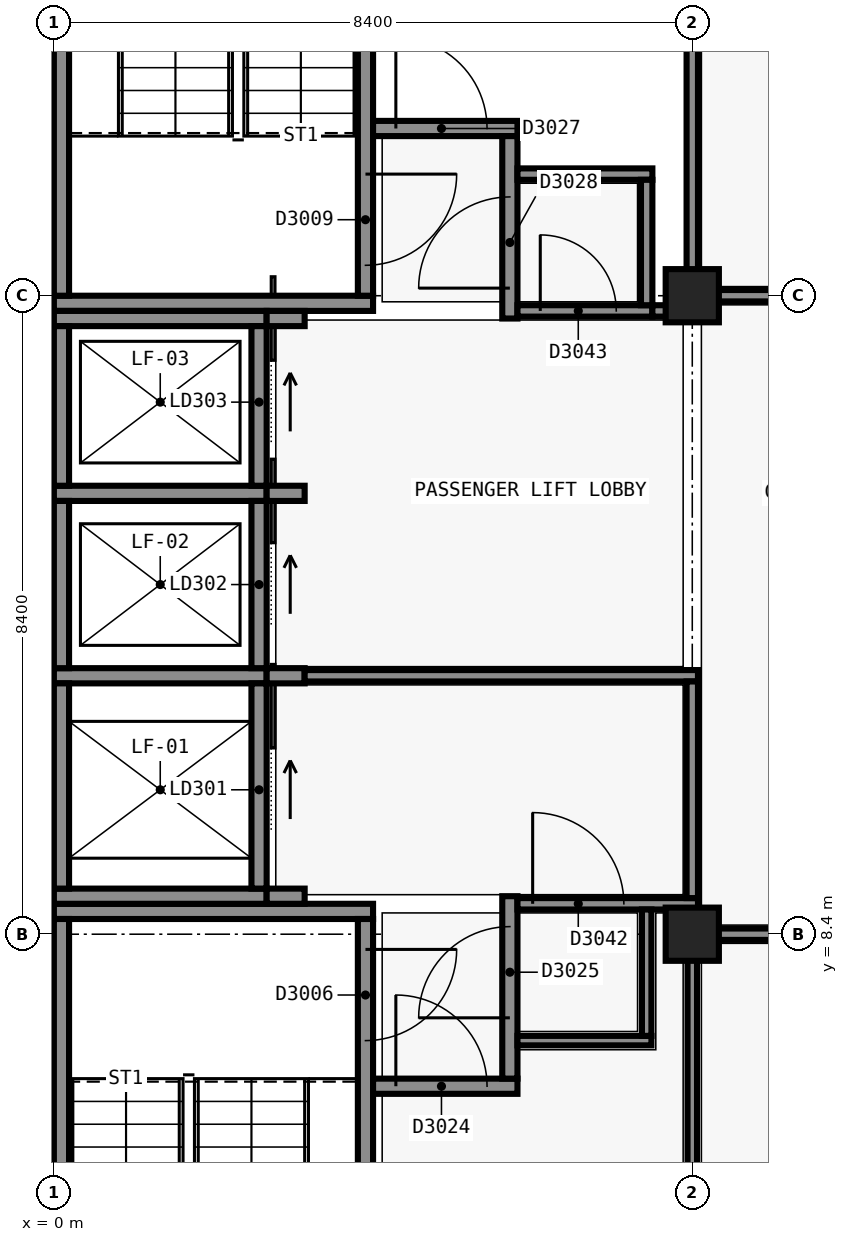
"""IFC4 building model, lengths in metres.
Left out: names, types, materials, properties, quantities, classifications, styles, units other than length and angle.
Written with IfcOpenShell. Run it as: python <this file> out.ifc"""

import sys

from ifc_helpers import new_model, si_unit, direction, frame, frame_2d, origin, origin_2d, place, context, subcontext, project, spatial, rectangle, extrude, element, fill, save


model = new_model("IFC4")
c1 = context("Model", 3, precision=1e-05, world=origin(), true_north=direction((0.0, 1.0)))
c2 = subcontext(c1, "Body", "Model", "MODEL_VIEW")
j1 = project(units=[si_unit("LENGTHUNIT", "METRE"), si_unit("PLANEANGLEUNIT", "RADIAN")], contexts=[c1])
p1 = place(None, origin())
s1 = spatial("IfcSite", under=j1, at=p1, CompositionType="ELEMENT")
p2 = place(p1, origin())
s2 = spatial("IfcBuilding", under=s1, at=p2, CompositionType="ELEMENT")
p3 = place(p2, frame((0.0, 0.0, 15.0)))
s3 = spatial("IfcBuildingStorey", under=s2, at=p3, CompositionType="ELEMENT", Elevation=15.0)
p4 = place(p3, frame((0.0, 8.7, 0.0), z_axis=(0.0, 0.0, 1.0), x_axis=(1.0, 0.0, 0.0)))
e1 = element("IfcWall", 1, at=p4, inside=s3, PredefinedType="SHEAR", context=c2, shape_type="SweptSolid", body=[
    extrude(rectangle(XDim=4.199, YDim=0.2, at=frame_2d((2.1, 0.0))), origin(), (0.0, 0.0, 1.0), 4.8),
])
p5 = place(p3, frame((0.1, 0.2, 0.0), z_axis=(0.0, 0.0, 1.0), x_axis=(0.0, 1.0, 0.0)))
e2 = element("IfcWall", 2, at=p5, inside=s3, PredefinedType="SHEAR", context=c2, shape_type="SweptSolid", body=[
    extrude(rectangle(XDim=8.4, YDim=0.2, at=frame_2d((4.2, 0.0))), origin(), (0.0, 0.0, 1.0), 4.8),
])
p6 = place(p3, frame((4.1, 8.6, 0.0), z_axis=(0.0, 0.0, 1.0), x_axis=(0.0, -1.0, 0.0)))
e3 = element("IfcWall", 3, at=p6, inside=s3, PredefinedType="SHEAR", context=c2, shape_type="SweptSolid", body=[
    extrude(rectangle(XDim=8.4, YDim=0.2, at=frame_2d((4.2, 0.0))), origin(), (0.0, 0.0, 1.0), 4.8),
])
p7 = place(p6, frame((0.4, 0.0, 0.0)))
e4 = element("IfcOpeningElement", 4, at=p7, cuts=e3, PredefinedType="OPENING", context=c2, shape_type="SweptSolid", body=[
    extrude(rectangle(XDim=1.2, YDim=2.1, at=frame_2d((0.6, 1.05))), frame((0.0, 0.11, 0.0), z_axis=(0.0, -1.0, 0.0), x_axis=(1.0, 0.0, 0.0)), (0.0, 0.0, 1.0), 0.22),
])
p8 = place(p3, frame((4.2, 16.7, 0.0), z_axis=(0.0, 0.0, 1.0), x_axis=(-1.0, 0.0, 0.0)))
e5 = element("IfcWall", 5, at=p8, inside=s3, PredefinedType="SHEAR", context=c2, shape_type="SweptSolid", body=[
    extrude(rectangle(XDim=4.199, YDim=0.2, at=frame_2d((2.1, 0.0))), origin(), (0.0, 0.0, 1.0), 4.8),
])
p9 = place(p3, frame((0.1, 16.8, 0.0), z_axis=(0.0, 0.0, 1.0), x_axis=(0.0, 1.0, 0.0)))
e6 = element("IfcWall", 6, at=p9, inside=s3, PredefinedType="SHEAR", context=c2, shape_type="SweptSolid", body=[
    extrude(rectangle(XDim=8.2, YDim=0.2, at=frame_2d((4.1, 0.0))), origin(), (0.0, 0.0, 1.0), 4.8),
])
p10 = place(p3, frame((4.1, 25.0, 0.0), z_axis=(0.0, 0.0, 1.0), x_axis=(0.0, -1.0, 0.0)))
e7 = element("IfcWall", 7, at=p10, inside=s3, PredefinedType="SHEAR", context=c2, shape_type="SweptSolid", body=[
    extrude(rectangle(XDim=8.2, YDim=0.2, at=frame_2d((4.1, 0.0))), origin(), (0.0, 0.0, 1.0), 4.8),
])
p11 = place(p10, frame((6.6, 0.0, 0.0)))
e8 = element("IfcOpeningElement", 8, at=p11, cuts=e7, PredefinedType="OPENING", context=c2, shape_type="SweptSolid", body=[
    extrude(rectangle(XDim=1.2, YDim=2.1, at=frame_2d((0.6, 1.05))), frame((0.0, 0.11, 0.0), z_axis=(0.0, -1.0, 0.0), x_axis=(1.0, 0.0, 0.0)), (0.0, 0.0, 1.0), 0.22),
])
for number, where, z_axis, x_axis in (
    (9, (2.8, 8.9, 0.0), (0.0, 0.0, 1.0), (-1.0, 0.0, 0.0)),
    (10, (0.0, 11.8, 0.0), (0.0, 0.0, 1.0), (1.0, 0.0, 0.0)),
):
    element("IfcWall", number, at=place(p3, frame(where, z_axis=z_axis, x_axis=x_axis)), inside=s3, PredefinedType="SHEAR", context=c2, shape_type="SweptSolid", body=[
        extrude(rectangle(XDim=2.8, YDim=0.2, at=frame_2d((1.4, 0.0))), origin(), (0.0, 0.0, 1.0), 4.8),
    ])
p12 = place(p3, frame((0.1, 9.0, 0.0), z_axis=(0.0, 0.0, 1.0), x_axis=(0.0, 1.0, 0.0)))
e11 = element("IfcWall", 11, at=p12, inside=s3, PredefinedType="SHEAR", context=c2, shape_type="SweptSolid", body=[
    extrude(rectangle(XDim=2.7, YDim=0.2, at=frame_2d((1.35, 0.0))), origin(), (0.0, 0.0, 1.0), 4.8),
])
p13 = place(p3, frame((2.7, 11.7, 0.0), z_axis=(0.0, 0.0, 1.0), x_axis=(0.0, -1.0, 0.0)))
e12 = element("IfcWall", 12, at=p13, inside=s3, PredefinedType="SHEAR", context=c2, shape_type="SweptSolid", body=[
    extrude(rectangle(XDim=2.7, YDim=0.2, at=frame_2d((1.35, 0.0))), origin(), (0.0, 0.0, 1.0), 4.8),
])
p14 = place(p13, frame((0.85, 0.0, 0.0)))
e13 = element("IfcOpeningElement", 13, at=p14, cuts=e12, PredefinedType="OPENING", context=c2, shape_type="SweptSolid", body=[
    extrude(rectangle(XDim=1.1, YDim=2.1, at=frame_2d((0.55, 1.05))), frame((0.0, 0.11, 0.0), z_axis=(0.0, -1.0, 0.0), x_axis=(1.0, 0.0, 0.0)), (0.0, 0.0, 1.0), 0.22),
])
p15 = place(p3, frame((0.0, 14.2, 0.0), z_axis=(0.0, 0.0, 1.0), x_axis=(1.0, 0.0, 0.0)))
e14 = element("IfcWall", 14, at=p15, inside=s3, PredefinedType="SHEAR", context=c2, shape_type="SweptSolid", body=[
    extrude(rectangle(XDim=2.8, YDim=0.2, at=frame_2d((1.4, 0.0))), origin(), (0.0, 0.0, 1.0), 4.8),
])
p16 = place(p3, frame((0.1, 11.9, 0.0), z_axis=(0.0, 0.0, 1.0), x_axis=(0.0, 1.0, 0.0)))
e15 = element("IfcWall", 15, at=p16, inside=s3, PredefinedType="SHEAR", context=c2, shape_type="SweptSolid", body=[
    extrude(rectangle(XDim=2.2, YDim=0.2, at=frame_2d((1.1, 0.0))), origin(), (0.0, 0.0, 1.0), 4.8),
])
p17 = place(p3, frame((2.7, 14.1, 0.0), z_axis=(0.0, 0.0, 1.0), x_axis=(0.0, -1.0, 0.0)))
e16 = element("IfcWall", 16, at=p17, inside=s3, PredefinedType="SHEAR", context=c2, shape_type="SweptSolid", body=[
    extrude(rectangle(XDim=2.2, YDim=0.2, at=frame_2d((1.1, 0.0))), origin(), (0.0, 0.0, 1.0), 4.8),
])
p18 = place(p17, frame((0.55, 0.0, 0.0)))
e17 = element("IfcOpeningElement", 17, at=p18, cuts=e16, PredefinedType="OPENING", context=c2, shape_type="SweptSolid", body=[
    extrude(rectangle(XDim=1.1, YDim=2.1, at=frame_2d((0.55, 1.05))), frame((0.0, 0.11, 0.0), z_axis=(0.0, -1.0, 0.0), x_axis=(1.0, 0.0, 0.0)), (0.0, 0.0, 1.0), 0.22),
])
p19 = place(p3, frame((0.0, 16.5, 0.0), z_axis=(0.0, 0.0, 1.0), x_axis=(1.0, 0.0, 0.0)))
e18 = element("IfcWall", 18, at=p19, inside=s3, PredefinedType="SHEAR", context=c2, shape_type="SweptSolid", body=[
    extrude(rectangle(XDim=2.8, YDim=0.2, at=frame_2d((1.4, 0.0))), origin(), (0.0, 0.0, 1.0), 4.8),
])
p20 = place(p3, frame((0.1, 14.3, 0.0), z_axis=(0.0, 0.0, 1.0), x_axis=(0.0, 1.0, 0.0)))
e19 = element("IfcWall", 19, at=p20, inside=s3, PredefinedType="SHEAR", context=c2, shape_type="SweptSolid", body=[
    extrude(rectangle(XDim=2.1, YDim=0.2, at=frame_2d((1.05, 0.0))), origin(), (0.0, 0.0, 1.0), 4.8),
])
p21 = place(p3, frame((2.7, 16.4, 0.0), z_axis=(0.0, 0.0, 1.0), x_axis=(0.0, -1.0, 0.0)))
e20 = element("IfcWall", 20, at=p21, inside=s3, PredefinedType="SHEAR", context=c2, shape_type="SweptSolid", body=[
    extrude(rectangle(XDim=2.1, YDim=0.2, at=frame_2d((1.05, 0.0))), origin(), (0.0, 0.0, 1.0), 4.8),
])
p22 = place(p21, frame((0.45, 0.0, 0.0)))
e21 = element("IfcOpeningElement", 21, at=p22, cuts=e20, PredefinedType="OPENING", context=c2, shape_type="SweptSolid", body=[
    extrude(rectangle(XDim=1.1, YDim=2.1, at=frame_2d((0.55, 1.05))), frame((0.0, 0.11, 0.0), z_axis=(0.0, -1.0, 0.0), x_axis=(1.0, 0.0, 0.0)), (0.0, 0.0, 1.0), 0.22),
])
for number, where, z_axis, x_axis in (
    (22, (8.4, 8.4, 0.0), (0.0, 0.0, 1.0), (1.0, 0.0, 0.0)),
    (23, (8.4, 16.8, 0.0), (0.0, 0.0, 1.0), (1.0, 0.0, 0.0)),
):
    element("IfcColumn", number, at=place(p3, frame(where, z_axis=z_axis, x_axis=x_axis)), inside=s3, PredefinedType="COLUMN", context=c2, shape_type="SweptSolid", body=[
        extrude(rectangle(XDim=0.7, YDim=0.7, at=origin_2d()), origin(), (0.0, 0.0, 1.0), 4.8),
    ])
for number, where, z_axis, x_axis in (
    (24, (3.3, 8.9, 0.0), (0.0, 0.0, 1.0), (-1.0, 0.0, 0.0)),
    (25, (2.8, 11.8, 0.0), (0.0, 0.0, 1.0), (1.0, 0.0, 0.0)),
    (26, (2.8, 14.2, 0.0), (0.0, 0.0, 1.0), (1.0, 0.0, 0.0)),
    (27, (2.8, 16.5, 0.0), (0.0, 0.0, 1.0), (1.0, 0.0, 0.0)),
):
    element("IfcWall", number, at=place(p3, frame(where, z_axis=z_axis, x_axis=x_axis)), inside=s3, PredefinedType="SHEAR", context=c2, shape_type="SweptSolid", body=[
        extrude(rectangle(XDim=0.5, YDim=0.2, at=frame_2d((0.25, 0.0))), origin(), (0.0, 0.0, 1.0), 4.8),
    ])
p23 = place(p3, frame((4.2, 6.4, 0.0), z_axis=(0.0, 0.0, 1.0), x_axis=(1.0, 0.0, 0.0)))
e28 = element("IfcWall", 28, at=p23, inside=s3, PredefinedType="SOLIDWALL", context=c2, shape_type="SweptSolid", body=[
    extrude(rectangle(XDim=1.9, YDim=0.2, at=frame_2d((0.95, 0.0))), origin(), (0.0, 0.0, 1.0), 4.5),
])
p24 = place(p23, frame((0.3, 0.0, 0.0)))
e29 = element("IfcOpeningElement", 29, at=p24, cuts=e28, PredefinedType="OPENING", context=c2, shape_type="SweptSolid", body=[
    extrude(rectangle(XDim=1.2, YDim=2.1, at=frame_2d((0.6, 1.05))), frame((0.0, 0.11, 0.0), z_axis=(0.0, -1.0, 0.0), x_axis=(1.0, 0.0, 0.0)), (0.0, 0.0, 1.0), 0.22),
])
p25 = place(p3, frame((4.2, 19.0, 0.0), z_axis=(0.0, 0.0, 1.0), x_axis=(1.0, 0.0, 0.0)))
e30 = element("IfcWall", 30, at=p25, inside=s3, PredefinedType="SOLIDWALL", context=c2, shape_type="SweptSolid", body=[
    extrude(rectangle(XDim=1.9, YDim=0.2, at=frame_2d((0.95, 0.0))), origin(), (0.0, 0.0, 1.0), 4.5),
])
p26 = place(p25, frame((0.3, 0.0, 0.0)))
e31 = element("IfcOpeningElement", 31, at=p26, cuts=e30, PredefinedType="OPENING", context=c2, shape_type="SweptSolid", body=[
    extrude(rectangle(XDim=1.2, YDim=2.1, at=frame_2d((0.6, 1.05))), frame((0.0, 0.11, 0.0), z_axis=(0.0, -1.0, 0.0), x_axis=(1.0, 0.0, 0.0)), (0.0, 0.0, 1.0), 0.22),
])
p27 = place(p3, frame((6.0, 6.5, 0.0), z_axis=(0.0, 0.0, 1.0), x_axis=(0.0, 1.0, 0.0)))
e32 = element("IfcWall", 32, at=p27, inside=s3, PredefinedType="SOLIDWALL", context=c2, shape_type="SweptSolid", body=[
    extrude(rectangle(XDim=2.4, YDim=0.2, at=frame_2d((1.2, 0.0))), origin(), (0.0, 0.0, 1.0), 4.0),
])
p28 = place(p27, frame((0.8, 0.0, 0.0)))
e33 = element("IfcOpeningElement", 33, at=p28, cuts=e32, PredefinedType="OPENING", context=c2, shape_type="SweptSolid", body=[
    extrude(rectangle(XDim=1.2, YDim=2.1, at=frame_2d((0.6, 1.05))), frame((0.0, 0.11, 0.0), z_axis=(0.0, -1.0, 0.0), x_axis=(1.0, 0.0, 0.0)), (0.0, 0.0, 1.0), 0.22),
])
p29 = place(p3, frame((6.0, 16.5, 0.0), z_axis=(0.0, 0.0, 1.0), x_axis=(0.0, 1.0, 0.0)))
e34 = element("IfcWall", 34, at=p29, inside=s3, PredefinedType="SOLIDWALL", context=c2, shape_type="SweptSolid", body=[
    extrude(rectangle(XDim=2.4, YDim=0.2, at=frame_2d((1.2, 0.0))), origin(), (0.0, 0.0, 1.0), 4.0),
])
p30 = place(p29, frame((0.4, 0.0, 0.0)))
e35 = element("IfcOpeningElement", 35, at=p30, cuts=e34, PredefinedType="OPENING", context=c2, shape_type="SweptSolid", body=[
    extrude(rectangle(XDim=1.2, YDim=2.1, at=frame_2d((0.6, 1.05))), frame((0.0, 0.11, 0.0), z_axis=(0.0, -1.0, 0.0), x_axis=(1.0, 0.0, 0.0)), (0.0, 0.0, 1.0), 0.22),
])
p31 = place(p3, frame((8.325, 8.4, 0.0), z_axis=(0.0, 0.0, 1.0), x_axis=(1.0, 0.0, 0.0)))
e36 = element("IfcWall", 36, at=p31, inside=s3, PredefinedType="PARTITIONING", context=c2, shape_type="SweptSolid", body=[
    extrude(rectangle(XDim=4.35, YDim=0.15, at=frame_2d((2.175, 0.0))), origin(), (0.0, 0.0, 1.0), 3.8),
])
p32 = place(p31, frame((1.675, 0.0, 0.0)))
e37 = element("IfcOpeningElement", 37, at=p32, cuts=e36, PredefinedType="OPENING", context=c2, shape_type="SweptSolid", body=[
    extrude(rectangle(XDim=1.0, YDim=2.1, at=frame_2d((0.5, 1.05))), frame((0.0, 0.085, 0.0), z_axis=(0.0, -1.0, 0.0), x_axis=(1.0, 0.0, 0.0)), (0.0, 0.0, 1.0), 0.17),
])
p33 = place(p3, frame((6.1, 16.6, 0.0), z_axis=(0.0, 0.0, 1.0), x_axis=(1.0, 0.0, 0.0)))
e38 = element("IfcWall", 38, at=p33, inside=s3, PredefinedType="PARTITIONING", context=c2, shape_type="SweptSolid", body=[
    extrude(rectangle(XDim=1.775, YDim=0.15, at=frame_2d((0.887, 0.0))), origin(), (0.0, 0.0, 1.0), 4.0),
])
p34 = place(p33, frame((0.3, 0.0, 0.0)))
e39 = element("IfcOpeningElement", 39, at=p34, cuts=e38, PredefinedType="OPENING", context=c2, shape_type="SweptSolid", body=[
    extrude(rectangle(XDim=1.0, YDim=2.1, at=frame_2d((0.5, 1.05))), frame((0.0, 0.085, 0.0), z_axis=(0.0, -1.0, 0.0), x_axis=(1.0, 0.0, 0.0)), (0.0, 0.0, 1.0), 0.17),
])
p35 = place(p3, frame((8.325, 16.8, 0.0), z_axis=(0.0, 0.0, 1.0), x_axis=(1.0, 0.0, 0.0)))
e40 = element("IfcWall", 40, at=p35, inside=s3, PredefinedType="PARTITIONING", context=c2, shape_type="SweptSolid", body=[
    extrude(rectangle(XDim=4.35, YDim=0.15, at=frame_2d((2.175, 0.0))), origin(), (0.0, 0.0, 1.0), 3.8),
])
p36 = place(p35, frame((1.675, 0.0, 0.0)))
e41 = element("IfcOpeningElement", 41, at=p36, cuts=e40, PredefinedType="OPENING", context=c2, shape_type="SweptSolid", body=[
    extrude(rectangle(XDim=1.0, YDim=2.1, at=frame_2d((0.5, 1.05))), frame((0.0, 0.085, 0.0), z_axis=(0.0, -1.0, 0.0), x_axis=(1.0, 0.0, 0.0)), (0.0, 0.0, 1.0), 0.17),
])
p37 = place(p3, frame((6.1, 8.8, 0.0), z_axis=(0.0, 0.0, 1.0), x_axis=(1.0, 0.0, 0.0)))
e42 = element("IfcWall", 42, at=p37, inside=s3, PredefinedType="SOLIDWALL", context=c2, shape_type="SweptSolid", body=[
    extrude(rectangle(XDim=2.375, YDim=0.15, at=frame_2d((1.188, 0.0))), origin(), (0.0, 0.0, 1.0), 3.8),
])
p38 = place(p37, frame((0.2, 0.0, 0.0)))
e43 = element("IfcOpeningElement", 43, at=p38, cuts=e42, PredefinedType="OPENING", context=c2, shape_type="SweptSolid", body=[
    extrude(rectangle(XDim=1.2, YDim=2.1, at=frame_2d((0.6, 1.05))), frame((0.0, 0.085, 0.0), z_axis=(0.0, -1.0, 0.0), x_axis=(1.0, 0.0, 0.0)), (0.0, 0.0, 1.0), 0.17),
])
p39 = place(p3, frame((3.3, 11.8, 0.0), z_axis=(0.0, 0.0, 1.0), x_axis=(1.0, 0.0, 0.0)))
e44 = element("IfcWall", 44, at=p39, inside=s3, PredefinedType="SOLIDWALL", context=c2, shape_type="SweptSolid", body=[
    extrude(rectangle(XDim=5.175, YDim=0.15, at=frame_2d((2.587, 0.0))), origin(), (0.0, 0.0, 1.0), 3.8),
])
p40 = place(p3, frame((7.875, 16.6, 0.0), z_axis=(0.0, 0.0, 1.0), x_axis=(1.0, 0.0, 0.0)))
e45 = element("IfcWall", 45, at=p40, inside=s3, PredefinedType="SOLIDWALL", context=c2, shape_type="SweptSolid", body=[
    extrude(rectangle(XDim=0.6, YDim=0.15, at=frame_2d((0.3, 0.0))), origin(), (0.0, 0.0, 1.0), 3.8),
])
p41 = place(p3, frame((6.1, 18.4, 0.0), z_axis=(0.0, 0.0, 1.0), x_axis=(1.0, 0.0, 0.0)))
e46 = element("IfcWall", 46, at=p41, inside=s3, PredefinedType="SOLIDWALL", context=c2, shape_type="SweptSolid", body=[
    extrude(rectangle(XDim=1.775, YDim=0.15, at=frame_2d((0.887, 0.0))), origin(), (0.0, 0.0, 1.0), 4.5),
])
p42 = place(p3, frame((8.4, 8.475, 0.0), z_axis=(0.0, 0.0, 1.0), x_axis=(0.0, 1.0, 0.0)))
e47 = element("IfcWall", 47, at=p42, inside=s3, PredefinedType="PARTITIONING", context=c2, shape_type="SweptSolid", body=[
    extrude(rectangle(XDim=0.25, YDim=0.15, at=frame_2d((0.125, 0.0))), origin(), (0.0, 0.0, 1.0), 3.8),
])
p43 = place(p3, frame((8.4, 8.875, 0.0), z_axis=(0.0, 0.0, 1.0), x_axis=(0.0, 1.0, 0.0)))
e48 = element("IfcWall", 48, at=p43, inside=s3, PredefinedType="SOLIDWALL", context=c2, shape_type="SweptSolid", body=[
    extrude(rectangle(XDim=2.85, YDim=0.15, at=frame_2d((1.425, 0.0))), origin(), (0.0, 0.0, 1.0), 3.8),
])
p44 = place(p3, frame((7.8, 16.675, 0.0), z_axis=(0.0, 0.0, 1.0), x_axis=(0.0, 1.0, 0.0)))
e49 = element("IfcWall", 49, at=p44, inside=s3, PredefinedType="SOLIDWALL", context=c2, shape_type="SweptSolid", body=[
    extrude(rectangle(XDim=1.65, YDim=0.15, at=frame_2d((0.825, 0.0))), origin(), (0.0, 0.0, 1.0), 4.0),
])
p45 = place(p3, frame((8.4, 16.875, 0.0), z_axis=(0.0, 0.0, 1.0), x_axis=(0.0, 1.0, 0.0)))
e50 = element("IfcWall", 50, at=p45, inside=s3, PredefinedType="SOLIDWALL", context=c2, shape_type="SweptSolid", body=[
    extrude(rectangle(XDim=7.575, YDim=0.15, at=frame_2d((3.788, 0.0))), origin(), (0.0, 0.0, 1.0), 3.8),
])
p46 = place(p3, frame((6.1, 7.0, 0.0), z_axis=(0.0, 0.0, 1.0), x_axis=(1.0, 0.0, 0.0)))
e51 = element("IfcWall", 51, at=p46, inside=s3, PredefinedType="PARTITIONING", context=c2, shape_type="SweptSolid", body=[
    extrude(rectangle(XDim=1.762, YDim=0.125, at=frame_2d((0.881, 0.0))), origin(), (0.0, 0.0, 1.0), 4.5),
])
p47 = place(p3, frame((7.8, 7.062, 0.0), z_axis=(0.0, 0.0, 1.0), x_axis=(0.0, 1.0, 0.0)))
e52 = element("IfcWall", 52, at=p47, inside=s3, PredefinedType="PARTITIONING", context=c2, shape_type="SweptSolid", body=[
    extrude(rectangle(XDim=1.663, YDim=0.125, at=frame_2d((0.831, 0.0))), origin(), (0.0, 0.0, 1.0), 4.0),
])
p48 = place(p3, frame((8.4, 0.75, 0.0), z_axis=(0.0, 0.0, 1.0), x_axis=(0.0, 1.0, 0.0)))
e53 = element("IfcWall", 53, at=p48, inside=s3, PredefinedType="PARTITIONING", context=c2, shape_type="SweptSolid", body=[
    extrude(rectangle(XDim=7.575, YDim=0.125, at=frame_2d((3.788, 0.0))), origin(), (0.0, 0.0, 1.0), 3.8),
])
p49 = place(p14, origin())
e54 = element("IfcDoor", 54, at=p49, inside=s3, OperationType="SLIDING_TO_LEFT", PredefinedType="DOOR", context=c2, shape_type="SweptSolid", body=[
    extrude(rectangle(XDim=1.1, YDim=2.1, at=frame_2d((0.55, 1.05))), frame((0.0, 0.025, 0.0), z_axis=(0.0, -1.0, 0.0), x_axis=(1.0, 0.0, 0.0)), (0.0, 0.0, 1.0), 0.05),
])
fill(e13, e54)
p50 = place(p18, origin())
e55 = element("IfcDoor", 55, at=p50, inside=s3, OperationType="SLIDING_TO_LEFT", PredefinedType="DOOR", context=c2, shape_type="SweptSolid", body=[
    extrude(rectangle(XDim=1.1, YDim=2.1, at=frame_2d((0.55, 1.05))), frame((0.0, 0.025, 0.0), z_axis=(0.0, -1.0, 0.0), x_axis=(1.0, 0.0, 0.0)), (0.0, 0.0, 1.0), 0.05),
])
fill(e17, e55)
p51 = place(p22, origin())
e56 = element("IfcDoor", 56, at=p51, inside=s3, OperationType="SLIDING_TO_LEFT", PredefinedType="DOOR", context=c2, shape_type="SweptSolid", body=[
    extrude(rectangle(XDim=1.1, YDim=2.1, at=frame_2d((0.55, 1.05))), frame((0.0, 0.025, 0.0), z_axis=(0.0, -1.0, 0.0), x_axis=(1.0, 0.0, 0.0)), (0.0, 0.0, 1.0), 0.05),
])
fill(e21, e56)
p52 = place(p7, origin())
e57 = element("IfcDoor", 57, at=p52, inside=s3, OperationType="SINGLE_SWING_RIGHT", PredefinedType="DOOR", context=c2, shape_type="SweptSolid", body=[
    extrude(rectangle(XDim=1.2, YDim=2.1, at=frame_2d((0.6, 1.05))), frame((0.0, 0.025, 0.0), z_axis=(0.0, -1.0, 0.0), x_axis=(1.0, 0.0, 0.0)), (0.0, 0.0, 1.0), 0.05),
])
fill(e4, e57)
p53 = place(p11, origin())
e58 = element("IfcDoor", 58, at=p53, inside=s3, OperationType="SINGLE_SWING_RIGHT", PredefinedType="DOOR", context=c2, shape_type="SweptSolid", body=[
    extrude(rectangle(XDim=1.2, YDim=2.1, at=frame_2d((0.6, 1.05))), frame((0.0, 0.025, 0.0), z_axis=(0.0, -1.0, 0.0), x_axis=(1.0, 0.0, 0.0)), (0.0, 0.0, 1.0), 0.05),
])
fill(e8, e58)
p54 = place(p24, origin())
e59 = element("IfcDoor", 59, at=p54, inside=s3, OperationType="SINGLE_SWING_LEFT", PredefinedType="DOOR", context=c2, shape_type="SweptSolid", body=[
    extrude(rectangle(XDim=1.2, YDim=2.1, at=frame_2d((0.6, 1.05))), frame((0.0, 0.025, 0.0), z_axis=(0.0, -1.0, 0.0), x_axis=(1.0, 0.0, 0.0)), (0.0, 0.0, 1.0), 0.05),
])
fill(e29, e59)
p55 = place(p28, origin())
e60 = element("IfcDoor", 60, at=p55, inside=s3, OperationType="SINGLE_SWING_RIGHT", PredefinedType="DOOR", context=c2, shape_type="SweptSolid", body=[
    extrude(rectangle(XDim=1.2, YDim=2.1, at=frame_2d((0.6, 1.05))), frame((0.0, 0.025, 0.0), z_axis=(0.0, -1.0, 0.0), x_axis=(1.0, 0.0, 0.0)), (0.0, 0.0, 1.0), 0.05),
])
fill(e33, e60)
p56 = place(p26, origin())
e61 = element("IfcDoor", 61, at=p56, inside=s3, OperationType="SINGLE_SWING_LEFT", PredefinedType="DOOR", context=c2, shape_type="SweptSolid", body=[
    extrude(rectangle(XDim=1.2, YDim=2.1, at=frame_2d((0.6, 1.05))), frame((0.0, 0.025, 0.0), z_axis=(0.0, -1.0, 0.0), x_axis=(1.0, 0.0, 0.0)), (0.0, 0.0, 1.0), 0.05),
])
fill(e31, e61)
p57 = place(p30, origin())
e62 = element("IfcDoor", 62, at=p57, inside=s3, OperationType="SINGLE_SWING_RIGHT", PredefinedType="DOOR", context=c2, shape_type="SweptSolid", body=[
    extrude(rectangle(XDim=1.2, YDim=2.1, at=frame_2d((0.6, 1.05))), frame((0.0, 0.025, 0.0), z_axis=(0.0, -1.0, 0.0), x_axis=(1.0, 0.0, 0.0)), (0.0, 0.0, 1.0), 0.05),
])
fill(e35, e62)
p58 = place(p38, origin())
e63 = element("IfcDoor", 63, at=p58, inside=s3, OperationType="SINGLE_SWING_RIGHT", PredefinedType="DOOR", context=c2, shape_type="SweptSolid", body=[
    extrude(rectangle(XDim=1.2, YDim=2.1, at=frame_2d((0.6, 1.05))), frame((0.0, 0.025, 0.0), z_axis=(0.0, -1.0, 0.0), x_axis=(1.0, 0.0, 0.0)), (0.0, 0.0, 1.0), 0.05),
])
fill(e43, e63)
p59 = place(p34, origin())
e64 = element("IfcDoor", 64, at=p59, inside=s3, OperationType="SINGLE_SWING_RIGHT", PredefinedType="DOOR", context=c2, shape_type="SweptSolid", body=[
    extrude(rectangle(XDim=1.0, YDim=2.1, at=frame_2d((0.5, 1.05))), frame((0.0, 0.025, 0.0), z_axis=(0.0, -1.0, 0.0), x_axis=(1.0, 0.0, 0.0)), (0.0, 0.0, 1.0), 0.05),
])
fill(e39, e64)
save(model, sys.argv[1])
